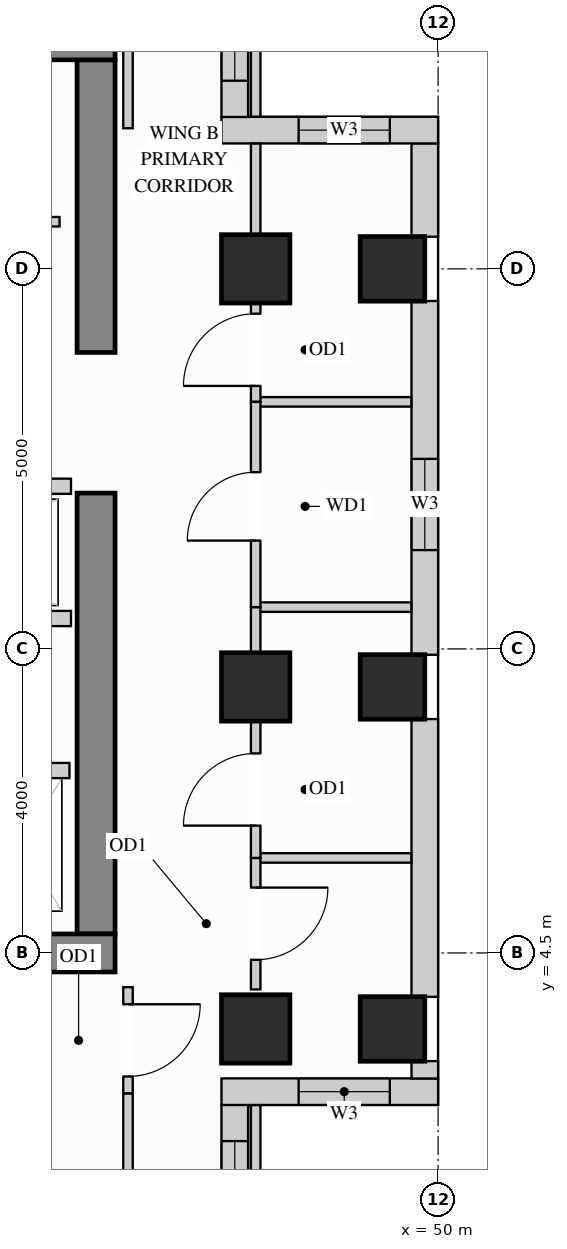
"""IFC4 building model, lengths in metres.
Left out: names, types, materials, properties, quantities, classifications, styles, units other than length and angle.
Written with IfcOpenShell. Run it as: python <this file> out.ifc"""

import sys

from ifc_helpers import new_model, si_unit, direction, frame, frame_2d, origin, origin_2d, place, context, subcontext, project, spatial, rectangle, extrude, source, transform, mapped, element, fill, save


model = new_model("IFC4")
c1 = context("Model", 3, precision=1e-05, world=origin(), true_north=direction((0.0, 1.0)))
c2 = subcontext(c1, "Body", "Model", "MODEL_VIEW")
j1 = project(units=[si_unit("LENGTHUNIT", "METRE"), si_unit("PLANEANGLEUNIT", "RADIAN")], contexts=[c1])
p1 = place(None, origin())
s1 = spatial("IfcSite", under=j1, at=p1, CompositionType="ELEMENT")
p2 = place(p1, origin())
s2 = spatial("IfcBuilding", under=s1, at=p2, CompositionType="ELEMENT")
p3 = place(p2, frame((0.0, 0.0, 259.2)))
s3 = spatial("IfcBuildingStorey", under=s2, at=p3, CompositionType="ELEMENT", Elevation=259.2)
m1 = source(origin(), c2, "Body", "SweptSolid", [
    extrude(rectangle(XDim=0.9, YDim=0.9, at=origin_2d()), origin(), (0.0, 0.0, 1.0), 3.4),
])
for number, where, z_axis, x_axis in (
    (1, (47.6, 13.5, 0.0), (0.0, 0.0, 1.0), (1.0, 0.0, 0.0)),
    (2, (47.6, 3.5, 0.0), (0.0, 0.0, 1.0), (1.0, 0.0, 0.0)),
    (3, (47.6, 8.0, 0.0), (0.0, 0.0, 1.0), (1.0, 0.0, 0.0)),
):
    element("IfcColumn", number, at=place(p3, frame(where, z_axis=z_axis, x_axis=x_axis)), inside=s3, PredefinedType="COLUMN", context=c2, shape_type="MappedRepresentation", body=[
        mapped(m1, transform((0.0, 0.0, 0.0), x_axis=(1.0, 0.0, 0.0), y_axis=(0.0, 1.0, 0.0), z_axis=(0.0, 0.0, 1.0))),
    ])
m2 = source(origin(), c2, "Body", "SweptSolid", [
    extrude(rectangle(XDim=0.85, YDim=0.85, at=origin_2d()), origin(), (0.0, 0.0, 1.0), 3.4),
])
for number, where, z_axis, x_axis in (
    (4, (49.4, 13.5, 0.0), (0.0, 0.0, 1.0), (1.0, 0.0, 0.0)),
    (5, (49.4, 3.5, 0.0), (0.0, 0.0, 1.0), (1.0, 0.0, 0.0)),
    (6, (49.4, 8.0, 0.0), (0.0, 0.0, 1.0), (1.0, 0.0, 0.0)),
):
    element("IfcColumn", number, at=place(p3, frame(where, z_axis=z_axis, x_axis=x_axis)), inside=s3, PredefinedType="COLUMN", context=c2, shape_type="MappedRepresentation", body=[
        mapped(m2, transform((0.0, 0.0, 0.0), x_axis=(1.0, 0.0, 0.0), y_axis=(0.0, 1.0, 0.0), z_axis=(0.0, 0.0, 1.0))),
    ])
m3 = source(origin(), c2, "Body", "SweptSolid", [
    extrude(rectangle(XDim=5.8, YDim=0.5, at=frame_2d((2.9, 0.0))), origin(), (0.0, 0.0, 1.0), 3.4),
])
p4 = place(p3, frame((45.5, 4.75, 0.0), z_axis=(0.0, 0.0, 1.0), x_axis=(0.0, 1.0, 0.0)))
e7 = element("IfcWall", 7, at=p4, inside=s3, PredefinedType="SHEAR", context=c2, shape_type="MappedRepresentation", body=[
    mapped(m3, transform((0.0, 0.0, 0.0), x_axis=(1.0, 0.0, 0.0), y_axis=(0.0, 1.0, 0.0), z_axis=(0.0, 0.0, 1.0))),
])
m4 = source(origin(), c2, "Body", "SweptSolid", [
    extrude(rectangle(XDim=3.85, YDim=0.5, at=frame_2d((1.925, 0.0))), origin(), (0.0, 0.0, 1.0), 3.4),
])
p5 = place(p3, frame((45.5, 12.4, 0.0), z_axis=(0.0, 0.0, 1.0), x_axis=(0.0, 1.0, 0.0)))
e8 = element("IfcWall", 8, at=p5, inside=s3, PredefinedType="SHEAR", context=c2, shape_type="MappedRepresentation", body=[
    mapped(m4, transform((0.0, 0.0, 0.0), x_axis=(1.0, 0.0, 0.0), y_axis=(0.0, 1.0, 0.0), z_axis=(0.0, 0.0, 1.0))),
])
m5 = source(origin(), c2, "Body", "SweptSolid", [
    extrude(rectangle(XDim=10.0, YDim=0.5, at=frame_2d((5.0, 0.0))), origin(), (0.0, 0.0, 1.0), 3.4),
])
for number, where, z_axis, x_axis in (
    (9, (35.75, 16.5, 0.0), (0.0, 0.0, 1.0), (1.0, 0.0, 0.0)),
    (10, (35.75, 4.5, 0.0), (0.0, 0.0, 1.0), (1.0, 0.0, 0.0)),
):
    element("IfcWall", number, at=place(p3, frame(where, z_axis=z_axis, x_axis=x_axis)), inside=s3, PredefinedType="SHEAR", context=c2, shape_type="MappedRepresentation", body=[
        mapped(m5, transform((0.0, 0.0, 0.0), x_axis=(1.0, 0.0, 0.0), y_axis=(0.0, 1.0, 0.0), z_axis=(0.0, 0.0, 1.0))),
    ])
p6 = place(p3, frame((47.325, 0.348, 0.0), z_axis=(0.0, 0.0, 1.0), x_axis=(0.0, 1.0, 0.0)))
e11 = element("IfcWall", 11, at=p6, inside=s3, PredefinedType="SOLIDWALL", context=c2, shape_type="SweptSolid", body=[
    extrude(rectangle(XDim=2.154, YDim=0.35, at=frame_2d((1.077, 0.0))), origin(), (0.0, 0.0, 1.0), 3.385),
])
p7 = place(p6, frame((0.477, 0.0, 0.78)))
e12 = element("IfcOpeningElement", 12, at=p7, cuts=e11, PredefinedType="OPENING", context=c2, shape_type="SweptSolid", body=[
    extrude(rectangle(XDim=1.2, YDim=2.25, at=frame_2d((0.6, 1.125))), frame((0.0, 0.185, 0.0), z_axis=(0.0, -1.0, 0.0), x_axis=(1.0, 0.0, 0.0)), (0.0, 0.0, 1.0), 0.37),
])
p8 = place(p3, frame((47.15, 2.675, 0.0), z_axis=(0.0, 0.0, 1.0), x_axis=(1.0, 0.0, 0.0)))
e13 = element("IfcWall", 13, at=p8, inside=s3, PredefinedType="SOLIDWALL", context=c2, shape_type="SweptSolid", body=[
    extrude(rectangle(XDim=2.85, YDim=0.35, at=frame_2d((1.425, 0.0))), origin(), (0.0, 0.0, 1.0), 3.385),
])
p9 = place(p8, frame((1.015, 0.0, 0.78)))
e14 = element("IfcOpeningElement", 14, at=p9, cuts=e13, PredefinedType="OPENING", context=c2, shape_type="SweptSolid", body=[
    extrude(rectangle(XDim=1.2, YDim=2.25, at=frame_2d((0.6, 1.125))), frame((0.0, 0.185, 0.0), z_axis=(0.0, -1.0, 0.0), x_axis=(1.0, 0.0, 0.0)), (0.0, 0.0, 1.0), 0.37),
])
m6 = source(origin(), c2, "Body", "SweptSolid", [
    extrude(rectangle(XDim=0.229, YDim=0.35, at=frame_2d((0.115, 0.0))), origin(), (0.0, 0.0, 1.0), 3.385),
])
p10 = place(p3, frame((49.825, 2.848, 0.0), z_axis=(0.0, 0.0, 1.0), x_axis=(0.0, 1.0, 0.0)))
e15 = element("IfcWall", 15, at=p10, inside=s3, PredefinedType="SOLIDWALL", context=c2, shape_type="MappedRepresentation", body=[
    mapped(m6, transform((0.0, 0.0, 0.0), x_axis=(1.0, 0.0, 0.0), y_axis=(0.0, 1.0, 0.0), z_axis=(0.0, 0.0, 1.0))),
])
m7 = source(origin(), c2, "Body", "SweptSolid", [
    extrude(rectangle(XDim=3.654, YDim=0.35, at=frame_2d((1.827, 0.0))), origin(), (0.0, 0.0, 1.0), 3.385),
])
p11 = place(p3, frame((49.825, 3.923, 0.0), z_axis=(0.0, 0.0, 1.0), x_axis=(0.0, 1.0, 0.0)))
e16 = element("IfcWall", 16, at=p11, inside=s3, PredefinedType="SOLIDWALL", context=c2, shape_type="MappedRepresentation", body=[
    mapped(m7, transform((0.0, 0.0, 0.0), x_axis=(1.0, 0.0, 0.0), y_axis=(0.0, 1.0, 0.0), z_axis=(0.0, 0.0, 1.0))),
])
p12 = place(p3, frame((49.825, 8.423, 0.0), z_axis=(0.0, 0.0, 1.0), x_axis=(0.0, 1.0, 0.0)))
e17 = element("IfcWall", 17, at=p12, inside=s3, PredefinedType="SOLIDWALL", context=c2, shape_type="SweptSolid", body=[
    extrude(rectangle(XDim=4.654, YDim=0.35, at=frame_2d((2.327, 0.0))), origin(), (0.0, 0.0, 1.0), 3.385),
])
p13 = place(p12, frame((1.377, 0.0, 0.78)))
e18 = element("IfcOpeningElement", 18, at=p13, cuts=e17, PredefinedType="OPENING", context=c2, shape_type="SweptSolid", body=[
    extrude(rectangle(XDim=1.2, YDim=2.25, at=frame_2d((0.6, 1.125))), frame((0.0, 0.185, 0.0), z_axis=(0.0, -1.0, 0.0), x_axis=(1.0, 0.0, 0.0)), (0.0, 0.0, 1.0), 0.37),
])
m8 = source(origin(), c2, "Body", "SweptSolid", [
    extrude(rectangle(XDim=1.229, YDim=0.35, at=frame_2d((0.615, 0.0))), origin(), (0.0, 0.0, 1.0), 3.385),
])
p14 = place(p3, frame((49.825, 13.923, 0.0), z_axis=(0.0, 0.0, 1.0), x_axis=(0.0, 1.0, 0.0)))
e19 = element("IfcWall", 19, at=p14, inside=s3, PredefinedType="SOLIDWALL", context=c2, shape_type="MappedRepresentation", body=[
    mapped(m8, transform((0.0, 0.0, 0.0), x_axis=(1.0, 0.0, 0.0), y_axis=(0.0, 1.0, 0.0), z_axis=(0.0, 0.0, 1.0))),
])
p15 = place(p3, frame((50.0, 15.325, 0.0), z_axis=(0.0, 0.0, 1.0), x_axis=(-1.0, 0.0, 0.0)))
e20 = element("IfcWall", 20, at=p15, inside=s3, PredefinedType="SOLIDWALL", context=c2, shape_type="SweptSolid", body=[
    extrude(rectangle(XDim=2.85, YDim=0.35, at=frame_2d((1.425, 0.0))), origin(), (0.0, 0.0, 1.0), 3.385),
])
p16 = place(p15, frame((0.635, 0.0, 0.78)))
e21 = element("IfcOpeningElement", 21, at=p16, cuts=e20, PredefinedType="OPENING", context=c2, shape_type="SweptSolid", body=[
    extrude(rectangle(XDim=1.2, YDim=2.25, at=frame_2d((0.6, 1.125))), frame((0.0, 0.185, 0.0), z_axis=(0.0, -1.0, 0.0), x_axis=(1.0, 0.0, 0.0)), (0.0, 0.0, 1.0), 0.37),
])
p17 = place(p3, frame((47.325, 15.498, 0.0), z_axis=(0.0, 0.0, 1.0), x_axis=(0.0, 1.0, 0.0)))
e22 = element("IfcWall", 22, at=p17, inside=s3, PredefinedType="SOLIDWALL", context=c2, shape_type="SweptSolid", body=[
    extrude(rectangle(XDim=2.154, YDim=0.35, at=frame_2d((1.077, 0.0))), origin(), (0.0, 0.0, 1.0), 3.385),
])
p18 = place(p17, frame((0.477, 0.0, 0.78)))
e23 = element("IfcOpeningElement", 23, at=p18, cuts=e22, PredefinedType="OPENING", context=c2, shape_type="SweptSolid", body=[
    extrude(rectangle(XDim=1.2, YDim=2.25, at=frame_2d((0.6, 1.125))), frame((0.0, 0.185, 0.0), z_axis=(0.0, -1.0, 0.0), x_axis=(1.0, 0.0, 0.0)), (0.0, 0.0, 1.0), 0.37),
])
p19 = place(p3, frame((40.75, 14.12, 0.0), z_axis=(0.0, 0.0, 1.0), x_axis=(1.0, 0.0, 0.0)))
e24 = element("IfcWall", 24, at=p19, inside=s3, PredefinedType="PARTITIONING", context=c2, shape_type="SweptSolid", body=[
    extrude(rectangle(XDim=4.27, YDim=0.125, at=frame_2d((2.135, 0.0))), origin(), (0.0, 0.0, 1.0), 3.385),
])
p20 = place(p19, frame((1.66, 0.0, 0.0)))
e25 = element("IfcOpeningElement", 25, at=p20, cuts=e24, PredefinedType="OPENING", context=c2, shape_type="SweptSolid", body=[
    extrude(rectangle(XDim=0.95, YDim=2.15, at=frame_2d((0.475, 1.075))), frame((0.0, 0.073, 0.0), z_axis=(0.0, -1.0, 0.0), x_axis=(1.0, 0.0, 0.0)), (0.0, 0.0, 1.0), 0.145),
])
m9 = source(origin(), c2, "Body", "SweptSolid", [
    extrude(rectangle(XDim=2.048, YDim=0.125, at=frame_2d((1.024, 0.0))), origin(), (0.0, 0.0, 1.0), 2.916),
])
p21 = place(p3, frame((47.6, 11.75, 0.0), z_axis=(0.0, 0.0, 1.0), x_axis=(1.0, 0.0, 0.0)))
e26 = element("IfcWall", 26, at=p21, inside=s3, PredefinedType="PARTITIONING", context=c2, shape_type="MappedRepresentation", body=[
    mapped(m9, transform((0.0, 0.0, 0.0), x_axis=(1.0, 0.0, 0.0), y_axis=(0.0, 1.0, 0.0), z_axis=(0.0, 0.0, 1.0))),
])
m10 = source(origin(), c2, "Body", "SweptSolid", [
    extrude(rectangle(XDim=2.048, YDim=0.125, at=frame_2d((1.024, 0.0))), origin(), (0.0, 0.0, 1.0), 3.385),
])
for number, where, z_axis, x_axis in (
    (27, (47.6, 5.75, 0.0), (0.0, 0.0, 1.0), (1.0, 0.0, 0.0)),
    (28, (47.6, 9.05, 0.0), (0.0, 0.0, 1.0), (1.0, 0.0, 0.0)),
):
    element("IfcWall", number, at=place(p3, frame(where, z_axis=z_axis, x_axis=x_axis)), inside=s3, PredefinedType="PARTITIONING", context=c2, shape_type="MappedRepresentation", body=[
        mapped(m10, transform((0.0, 0.0, 0.0), x_axis=(1.0, 0.0, 0.0), y_axis=(0.0, 1.0, 0.0), z_axis=(0.0, 0.0, 1.0))),
    ])
p22 = place(p3, frame((47.6, 4.02, 0.0), z_axis=(0.0, 0.0, 1.0), x_axis=(0.0, 1.0, 0.0)))
e29 = element("IfcWall", 29, at=p22, inside=s3, PredefinedType="PARTITIONING", context=c2, shape_type="SweptSolid", body=[
    extrude(rectangle(XDim=1.73, YDim=0.125, at=frame_2d((0.865, 0.0))), origin(), (0.0, 0.0, 1.0), 2.773),
])
p23 = place(p22, frame((0.39, 0.0, 0.0)))
e30 = element("IfcOpeningElement", 30, at=p23, cuts=e29, PredefinedType="OPENING", context=c2, shape_type="SweptSolid", body=[
    extrude(rectangle(XDim=0.95, YDim=2.15, at=frame_2d((0.475, 1.075))), frame((0.0, 0.073, 0.0), z_axis=(0.0, -1.0, 0.0), x_axis=(1.0, 0.0, 0.0)), (0.0, 0.0, 1.0), 0.145),
])
m11 = source(origin(), c2, "Body", "SweptSolid", [
    extrude(rectangle(XDim=2.148, YDim=0.125, at=frame_2d((1.074, 0.0))), origin(), (0.0, 0.0, 1.0), 3.385),
])
p24 = place(p3, frame((47.6, 0.35, 0.0), z_axis=(0.0, 0.0, 1.0), x_axis=(0.0, 1.0, 0.0)))
e31 = element("IfcWall", 31, at=p24, inside=s3, PredefinedType="PARTITIONING", context=c2, shape_type="MappedRepresentation", body=[
    mapped(m11, transform((0.0, 0.0, 0.0), x_axis=(1.0, 0.0, 0.0), y_axis=(0.0, 1.0, 0.0), z_axis=(0.0, 0.0, 1.0))),
])
p25 = place(p3, frame((47.6, 5.75, 0.0), z_axis=(0.0, 0.0, 1.0), x_axis=(0.0, 1.0, 0.0)))
e32 = element("IfcWall", 32, at=p25, inside=s3, PredefinedType="PARTITIONING", context=c2, shape_type="SweptSolid", body=[
    extrude(rectangle(XDim=1.8, YDim=0.125, at=frame_2d((0.9, 0.0))), origin(), (0.0, 0.0, 1.0), 2.773),
])
p26 = place(p25, frame((0.425, 0.0, 0.0)))
e33 = element("IfcOpeningElement", 33, at=p26, cuts=e32, PredefinedType="OPENING", context=c2, shape_type="SweptSolid", body=[
    extrude(rectangle(XDim=0.95, YDim=2.15, at=frame_2d((0.475, 1.075))), frame((0.0, 0.073, 0.0), z_axis=(0.0, -1.0, 0.0), x_axis=(1.0, 0.0, 0.0)), (0.0, 0.0, 1.0), 0.145),
])
m12 = source(origin(), c2, "Body", "SweptSolid", [
    extrude(rectangle(XDim=0.6, YDim=0.125, at=frame_2d((0.3, 0.0))), origin(), (0.0, 0.0, 1.0), 2.773),
])
p27 = place(p3, frame((47.6, 8.45, 0.0), z_axis=(0.0, 0.0, 1.0), x_axis=(0.0, 1.0, 0.0)))
e34 = element("IfcWall", 34, at=p27, inside=s3, PredefinedType="PARTITIONING", context=c2, shape_type="MappedRepresentation", body=[
    mapped(m12, transform((0.0, 0.0, 0.0), x_axis=(1.0, 0.0, 0.0), y_axis=(0.0, 1.0, 0.0), z_axis=(0.0, 0.0, 1.0))),
])
p28 = place(p3, frame((47.6, 11.75, 0.0), z_axis=(0.0, 0.0, 1.0), x_axis=(0.0, 1.0, 0.0)))
e35 = element("IfcWall", 35, at=p28, inside=s3, PredefinedType="PARTITIONING", context=c2, shape_type="SweptSolid", body=[
    extrude(rectangle(XDim=1.3, YDim=0.125, at=frame_2d((0.65, 0.0))), origin(), (0.0, 0.0, 1.0), 2.773),
])
p29 = place(p28, frame((0.21, 0.0, 0.0)))
e36 = element("IfcOpeningElement", 36, at=p29, cuts=e35, PredefinedType="OPENING", context=c2, shape_type="SweptSolid", body=[
    extrude(rectangle(XDim=0.95, YDim=2.15, at=frame_2d((0.475, 1.075))), frame((0.0, 0.073, 0.0), z_axis=(0.0, -1.0, 0.0), x_axis=(1.0, 0.0, 0.0)), (0.0, 0.0, 1.0), 0.145),
])
m13 = source(origin(), c2, "Body", "SweptSolid", [
    extrude(rectangle(XDim=1.198, YDim=0.125, at=frame_2d((0.599, 0.0))), origin(), (0.0, 0.0, 1.0), 3.385),
])
p30 = place(p3, frame((47.6, 13.95, 0.0), z_axis=(0.0, 0.0, 1.0), x_axis=(0.0, 1.0, 0.0)))
e37 = element("IfcWall", 37, at=p30, inside=s3, PredefinedType="PARTITIONING", context=c2, shape_type="MappedRepresentation", body=[
    mapped(m13, transform((0.0, 0.0, 0.0), x_axis=(1.0, 0.0, 0.0), y_axis=(0.0, 1.0, 0.0), z_axis=(0.0, 0.0, 1.0))),
])
p31 = place(p3, frame((47.6, 15.502, 0.0), z_axis=(0.0, 0.0, 1.0), x_axis=(0.0, 1.0, 0.0)))
e38 = element("IfcWall", 38, at=p31, inside=s3, PredefinedType="PARTITIONING", context=c2, shape_type="MappedRepresentation", body=[
    mapped(m11, transform((0.0, 0.0, 0.0), x_axis=(1.0, 0.0, 0.0), y_axis=(0.0, 1.0, 0.0), z_axis=(0.0, 0.0, 1.0))),
])
p32 = place(p3, frame((47.6, 9.05, 0.0), z_axis=(0.0, 0.0, 1.0), x_axis=(0.0, 1.0, 0.0)))
e39 = element("IfcWall", 39, at=p32, inside=s3, PredefinedType="PARTITIONING", context=c2, shape_type="SweptSolid", body=[
    extrude(rectangle(XDim=2.7, YDim=0.125, at=frame_2d((1.35, 0.0))), origin(), (0.0, 0.0, 1.0), 2.773),
])
p33 = place(p32, frame((0.875, 0.0, 0.0)))
e40 = element("IfcOpeningElement", 40, at=p33, cuts=e39, PredefinedType="OPENING", context=c2, shape_type="SweptSolid", body=[
    extrude(rectangle(XDim=0.9, YDim=2.15, at=frame_2d((0.45, 1.075))), frame((0.0, 0.073, 0.0), z_axis=(0.0, -1.0, 0.0), x_axis=(1.0, 0.0, 0.0)), (0.0, 0.0, 1.0), 0.145),
])
m14 = source(origin(), c2, "Body", "SweptSolid", [
    extrude(rectangle(XDim=2.298, YDim=0.125, at=frame_2d((1.149, 0.0))), origin(), (0.0, 0.0, 1.0), 3.385),
])
p34 = place(p3, frame((45.92, 15.35, 0.0), z_axis=(0.0, 0.0, 1.0), x_axis=(0.0, 1.0, 0.0)))
e41 = element("IfcWall", 41, at=p34, inside=s3, PredefinedType="PARTITIONING", context=c2, shape_type="MappedRepresentation", body=[
    mapped(m14, transform((0.0, 0.0, 0.0), x_axis=(1.0, 0.0, 0.0), y_axis=(0.0, 1.0, 0.0), z_axis=(0.0, 0.0, 1.0))),
])
p35 = place(p3, frame((45.92, 2.65, 0.0), z_axis=(0.0, 0.0, 1.0), x_axis=(0.0, 1.0, 0.0)))
e42 = element("IfcWall", 42, at=p35, inside=s3, PredefinedType="PARTITIONING", context=c2, shape_type="SweptSolid", body=[
    extrude(rectangle(XDim=1.4, YDim=0.125, at=frame_2d((0.7, 0.0))), origin(), (0.0, 0.0, 1.0), 3.385),
])
p36 = place(p35, frame((0.225, 0.0, 0.0)))
e43 = element("IfcOpeningElement", 43, at=p36, cuts=e42, PredefinedType="OPENING", context=c2, shape_type="SweptSolid", body=[
    extrude(rectangle(XDim=0.95, YDim=2.15, at=frame_2d((0.475, 1.075))), frame((0.0, 0.073, 0.0), z_axis=(0.0, -1.0, 0.0), x_axis=(1.0, 0.0, 0.0)), (0.0, 0.0, 1.0), 0.145),
])
p37 = place(p3, frame((45.92, 0.352, 0.0), z_axis=(0.0, 0.0, 1.0), x_axis=(0.0, 1.0, 0.0)))
e44 = element("IfcWall", 44, at=p37, inside=s3, PredefinedType="PARTITIONING", context=c2, shape_type="MappedRepresentation", body=[
    mapped(m14, transform((0.0, 0.0, 0.0), x_axis=(1.0, 0.0, 0.0), y_axis=(0.0, 1.0, 0.0), z_axis=(0.0, 0.0, 1.0))),
])
m15 = source(origin(), c2, "Body", "SweptSolid", [
    extrude(rectangle(XDim=1.3, YDim=0.2, at=frame_2d((0.65, 0.0))), origin(), (0.0, 0.0, 1.0), 3.385),
])
p38 = place(p3, frame((43.85, 6.9, 0.0), z_axis=(0.0, 0.0, 1.0), x_axis=(1.0, 0.0, 0.0)))
e45 = element("IfcWall", 45, at=p38, inside=s3, PredefinedType="PARTITIONING", context=c2, shape_type="MappedRepresentation", body=[
    mapped(m15, transform((0.0, 0.0, 0.0), x_axis=(1.0, 0.0, 0.0), y_axis=(0.0, 1.0, 0.0), z_axis=(0.0, 0.0, 1.0))),
])
m16 = source(origin(), c2, "Body", "SweptSolid", [
    extrude(rectangle(XDim=3.49, YDim=0.2, at=frame_2d((1.745, 0.0))), origin(), (0.0, 0.0, 1.0), 3.385),
])
for number, where, z_axis, x_axis in (
    (46, (41.68, 10.64, 0.0), (0.0, 0.0, 1.0), (1.0, 0.0, 0.0)),
    (47, (41.68, 8.9, 0.0), (0.0, 0.0, 1.0), (1.0, 0.0, 0.0)),
):
    element("IfcWall", number, at=place(p3, frame(where, z_axis=z_axis, x_axis=x_axis)), inside=s3, PredefinedType="PARTITIONING", context=c2, shape_type="MappedRepresentation", body=[
        mapped(m16, transform((0.0, 0.0, 0.0), x_axis=(1.0, 0.0, 0.0), y_axis=(0.0, 1.0, 0.0), z_axis=(0.0, 0.0, 1.0))),
    ])
m17 = source(origin(), c2, "Body", "SweptSolid", [
    extrude(rectangle(XDim=0.95, YDim=2.15, at=frame_2d((0.475, 1.075))), frame((0.0, 0.025, 0.0), z_axis=(0.0, -1.0, 0.0), x_axis=(1.0, 0.0, 0.0)), (0.0, 0.0, 1.0), 0.05),
])
p39 = place(p36, origin())
e48 = element("IfcDoor", 48, at=p39, inside=s3, OperationType="SINGLE_SWING_RIGHT", PredefinedType="DOOR", context=c2, shape_type="MappedRepresentation", body=[
    mapped(m17, transform((0.0, 0.0, 0.0), x_axis=(1.0, 0.0, 0.0), y_axis=(0.0, 1.0, 0.0), z_axis=(0.0, 0.0, 1.0))),
])
fill(e43, e48)
p40 = place(p23, origin())
e49 = element("IfcDoor", 49, at=p40, inside=s3, OperationType="SINGLE_SWING_RIGHT", PredefinedType="DOOR", context=c2, shape_type="MappedRepresentation", body=[
    mapped(m17, transform((0.0, 0.0, 0.0), x_axis=(1.0, 0.0, 0.0), y_axis=(0.0, 1.0, 0.0), z_axis=(0.0, 0.0, 1.0))),
])
fill(e30, e49)
p41 = place(p26, origin())
e50 = element("IfcDoor", 50, at=p41, inside=s3, OperationType="SINGLE_SWING_LEFT", PredefinedType="DOOR", context=c2, shape_type="MappedRepresentation", body=[
    mapped(m17, transform((0.0, 0.0, 0.0), x_axis=(1.0, 0.0, 0.0), y_axis=(0.0, 1.0, 0.0), z_axis=(0.0, 0.0, 1.0))),
])
fill(e33, e50)
p42 = place(p29, origin())
e51 = element("IfcDoor", 51, at=p42, inside=s3, OperationType="SINGLE_SWING_LEFT", PredefinedType="DOOR", context=c2, shape_type="MappedRepresentation", body=[
    mapped(m17, transform((0.0, 0.0, 0.0), x_axis=(1.0, 0.0, 0.0), y_axis=(0.0, 1.0, 0.0), z_axis=(0.0, 0.0, 1.0))),
])
fill(e36, e51)
m18 = source(origin(), c2, "Body", "SweptSolid", [
    extrude(rectangle(XDim=0.9, YDim=2.15, at=frame_2d((0.45, 1.075))), frame((0.0, 0.025, 0.0), z_axis=(0.0, -1.0, 0.0), x_axis=(1.0, 0.0, 0.0)), (0.0, 0.0, 1.0), 0.05),
])
p43 = place(p33, origin())
e52 = element("IfcDoor", 52, at=p43, inside=s3, OperationType="SINGLE_SWING_LEFT", PredefinedType="DOOR", context=c2, shape_type="MappedRepresentation", body=[
    mapped(m18, transform((0.0, 0.0, 0.0), x_axis=(1.0, 0.0, 0.0), y_axis=(0.0, 1.0, 0.0), z_axis=(0.0, 0.0, 1.0))),
])
fill(e40, e52)
m19 = source(origin(), c2, "Body", "SweptSolid", [
    extrude(rectangle(XDim=1.2, YDim=2.25, at=frame_2d((0.6, 1.125))), frame((0.0, 0.03, 0.0), z_axis=(0.0, -1.0, 0.0), x_axis=(1.0, 0.0, 0.0)), (0.0, 0.0, 1.0), 0.06),
])
p44 = place(p7, origin())
e53 = element("IfcWindow", 53, at=p44, inside=s3, PartitioningType="SINGLE_PANEL", PredefinedType="WINDOW", context=c2, shape_type="MappedRepresentation", body=[
    mapped(m19, transform((0.0, 0.0, 0.0), x_axis=(1.0, 0.0, 0.0), y_axis=(0.0, 1.0, 0.0), z_axis=(0.0, 0.0, 1.0))),
])
fill(e12, e53)
p45 = place(p9, origin())
e54 = element("IfcWindow", 54, at=p45, inside=s3, PartitioningType="SINGLE_PANEL", PredefinedType="WINDOW", context=c2, shape_type="MappedRepresentation", body=[
    mapped(m19, transform((0.0, 0.0, 0.0), x_axis=(1.0, 0.0, 0.0), y_axis=(0.0, 1.0, 0.0), z_axis=(0.0, 0.0, 1.0))),
])
fill(e14, e54)
p46 = place(p13, origin())
e55 = element("IfcWindow", 55, at=p46, inside=s3, PartitioningType="SINGLE_PANEL", PredefinedType="WINDOW", context=c2, shape_type="MappedRepresentation", body=[
    mapped(m19, transform((0.0, 0.0, 0.0), x_axis=(1.0, 0.0, 0.0), y_axis=(0.0, 1.0, 0.0), z_axis=(0.0, 0.0, 1.0))),
])
fill(e18, e55)
p47 = place(p16, origin())
e56 = element("IfcWindow", 56, at=p47, inside=s3, PartitioningType="SINGLE_PANEL", PredefinedType="WINDOW", context=c2, shape_type="MappedRepresentation", body=[
    mapped(m19, transform((0.0, 0.0, 0.0), x_axis=(1.0, 0.0, 0.0), y_axis=(0.0, 1.0, 0.0), z_axis=(0.0, 0.0, 1.0))),
])
fill(e21, e56)
p48 = place(p18, origin())
e57 = element("IfcWindow", 57, at=p48, inside=s3, PartitioningType="SINGLE_PANEL", PredefinedType="WINDOW", context=c2, shape_type="MappedRepresentation", body=[
    mapped(m19, transform((0.0, 0.0, 0.0), x_axis=(1.0, 0.0, 0.0), y_axis=(0.0, 1.0, 0.0), z_axis=(0.0, 0.0, 1.0))),
])
fill(e23, e57)
save(model, sys.argv[1])
